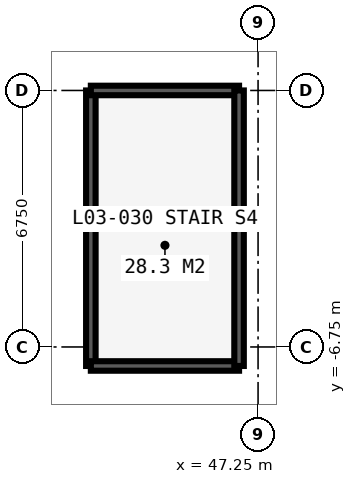
"""IFC4 building model, lengths in metres.
Left out: names, types, materials, properties, quantities, classifications, styles, units other than length and angle.
Written with IfcOpenShell. Run it as: python <this file> out.ifc"""

import sys

from ifc_helpers import new_model, si_unit, direction, frame, frame_2d, origin, place, context, subcontext, project, spatial, rectangle, extrude, element, fill, save


model = new_model("IFC4")
c1 = context("Model", 3, precision=1e-05, world=origin(), true_north=direction((0.0, 1.0)))
c2 = subcontext(c1, "Body", "Model", "MODEL_VIEW")
j1 = project(units=[si_unit("LENGTHUNIT", "METRE"), si_unit("PLANEANGLEUNIT", "RADIAN")], contexts=[c1])
p1 = place(None, origin())
s1 = spatial("IfcSite", under=j1, at=p1, CompositionType="ELEMENT")
p2 = place(p1, origin())
s2 = spatial("IfcBuilding", under=s1, at=p2, CompositionType="ELEMENT")
p3 = place(p2, frame((0.0, 0.0, 13.5)))
s3 = spatial("IfcBuildingStorey", under=s2, at=p3, CompositionType="ELEMENT", Elevation=13.5)
p4 = place(p3, frame((42.85, -7.25, -0.06), z_axis=(0.0, 0.0, 1.0), x_axis=(0.0, 1.0, 0.0)))
e1 = element("IfcWall", 1, at=p4, inside=s3, PredefinedType="SOLIDWALL", context=c2, shape_type="SweptSolid", body=[
    extrude(rectangle(XDim=7.25, YDim=0.25, at=frame_2d((3.625, 0.0))), origin(), (0.0, 0.0, 1.0), 4.335),
])
p5 = place(p4, frame((0.3, 0.0, 0.0)))
e2 = element("IfcOpeningElement", 2, at=p5, cuts=e1, PredefinedType="OPENING", context=c2, shape_type="SweptSolid", body=[
    extrude(rectangle(XDim=1.2, YDim=2.2, at=frame_2d((0.6, 1.1))), frame((0.0, 0.135, 0.0), z_axis=(0.0, -1.0, 0.0), x_axis=(1.0, 0.0, 0.0)), (0.0, 0.0, 1.0), 0.27),
])
for number, where, z_axis, x_axis in (
    (3, (42.85, -7.25, -0.06), (0.0, 0.0, 1.0), (1.0, 0.0, 0.0)),
    (4, (42.85, 0.0, -0.06), (0.0, 0.0, 1.0), (1.0, 0.0, 0.0)),
):
    element("IfcWall", number, at=place(p3, frame(where, z_axis=z_axis, x_axis=x_axis)), inside=s3, PredefinedType="SOLIDWALL", context=c2, shape_type="SweptSolid", body=[
        extrude(rectangle(XDim=3.9, YDim=0.25, at=frame_2d((1.95, 0.0))), origin(), (0.0, 0.0, 1.0), 4.335),
    ])
p6 = place(p3, frame((46.75, -7.25, -0.06), z_axis=(0.0, 0.0, 1.0), x_axis=(0.0, 1.0, 0.0)))
e5 = element("IfcWall", 5, at=p6, inside=s3, PredefinedType="SOLIDWALL", context=c2, shape_type="SweptSolid", body=[
    extrude(rectangle(XDim=7.25, YDim=0.25, at=frame_2d((3.625, 0.0))), origin(), (0.0, 0.0, 1.0), 4.335),
])
p7 = place(p5, origin())
e6 = element("IfcDoor", 6, at=p7, inside=s3, OperationType="SINGLE_SWING_LEFT", PredefinedType="DOOR", context=c2, shape_type="SweptSolid", body=[
    extrude(rectangle(XDim=1.2, YDim=2.2, at=frame_2d((0.6, 1.1))), frame((0.0, 0.025, 0.0), z_axis=(0.0, -1.0, 0.0), x_axis=(1.0, 0.0, 0.0)), (0.0, 0.0, 1.0), 0.05),
])
fill(e2, e6)
save(model, sys.argv[1])
